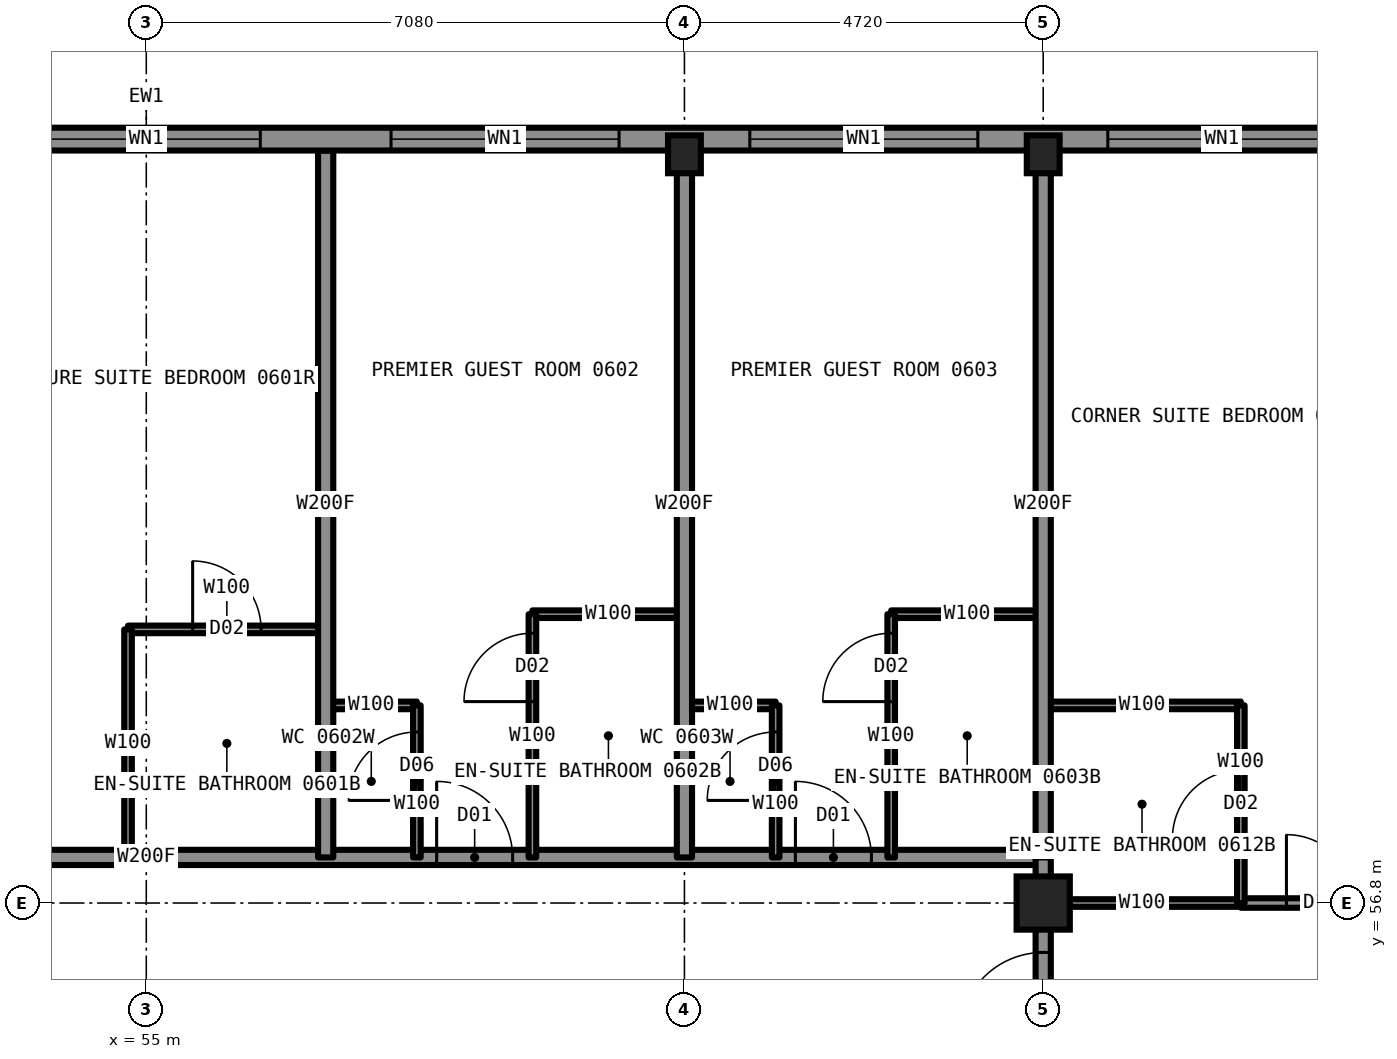
"""IFC4 building model, lengths in metres.
Left out: names, types, materials, properties, quantities, classifications, styles, units other than length and angle.
Written with IfcOpenShell. Run it as: python <this file> out.ifc"""

import sys

from ifc_helpers import new_model, si_unit, direction, frame, frame_2d, origin, origin_2d, place, context, subcontext, project, spatial, rectangle, hollow_rectangle, i_section, extrude, element, fill, save


model = new_model("IFC4")
c1 = context("Model", 3, precision=1e-05, world=origin(), true_north=direction((0.0, 1.0)))
c2 = subcontext(c1, "Body", "Model", "MODEL_VIEW")
j1 = project(units=[si_unit("LENGTHUNIT", "METRE"), si_unit("PLANEANGLEUNIT", "RADIAN")], contexts=[c1])
p1 = place(None, origin())
s1 = spatial("IfcSite", under=j1, at=p1, CompositionType="ELEMENT")
p2 = place(p1, origin())
s2 = spatial("IfcBuilding", under=s1, at=p2, CompositionType="ELEMENT")
p3 = place(p2, frame((0.0, 0.0, 28.5)))
s3 = spatial("IfcBuildingStorey", under=s2, at=p3, CompositionType="ELEMENT", Elevation=28.5)
for number, where, z_axis, x_axis in (
    (1, (62.08, 66.65, 0.0), (0.0, 0.0, 1.0), (1.0, 0.0, 0.0)),
    (2, (66.8, 66.65, 0.0), (0.0, 0.0, 1.0), (1.0, 0.0, 0.0)),
):
    element("IfcColumn", number, at=place(p3, frame(where, z_axis=z_axis, x_axis=x_axis)), inside=s3, PredefinedType="COLUMN", context=c2, shape_type="SweptSolid", body=[
        extrude(i_section(OverallWidth=0.432, OverallDepth=0.498, WebThickness=0.056, FlangeThickness=0.089, at=origin_2d()), origin(), (0.0, 0.0, 1.0), 3.5),
    ])
p4 = place(p3, frame((66.8, 56.8, 0.0), z_axis=(0.0, 0.0, 1.0), x_axis=(1.0, 0.0, 0.0)))
e3 = element("IfcColumn", 3, at=p4, inside=s3, PredefinedType="COLUMN", context=c2, shape_type="SweptSolid", body=[
    extrude(hollow_rectangle(XDim=0.7, YDim=0.7, WallThickness=0.06, at=origin_2d()), origin(), (0.0, 0.0, 1.0), 3.5),
])
p5 = place(p3, frame((66.8, 56.8, 0.0), z_axis=(0.0, 0.0, 1.0), x_axis=(1.0, 0.0, 0.0)))
e4 = element("IfcWall", 4, at=p5, inside=s3, PredefinedType="PARTITIONING", context=c2, shape_type="SweptSolid", body=[
    extrude(rectangle(XDim=2.6, YDim=0.1, at=frame_2d((1.3, 0.0))), origin(), (0.0, 0.0, 1.0), 2.573),
])
p6 = place(p3, frame((69.4, 56.8, 0.0), z_axis=(0.0, 0.0, 1.0), x_axis=(1.0, 0.0, 0.0)))
e5 = element("IfcWall", 5, at=p6, inside=s3, PredefinedType="PARTITIONING", context=c2, shape_type="SweptSolid", body=[
    extrude(rectangle(XDim=7.3, YDim=0.125, at=frame_2d((3.65, 0.0))), origin(), (0.0, 0.0, 1.0), 2.573),
])
p7 = place(p6, frame((0.6, 0.0, 0.0)))
e6 = element("IfcOpeningElement", 6, at=p7, cuts=e5, PredefinedType="OPENING", context=c2, shape_type="SweptSolid", body=[
    extrude(rectangle(XDim=0.9, YDim=2.2, at=frame_2d((0.45, 1.1))), frame((0.0, 0.073, 0.0), z_axis=(0.0, -1.0, 0.0), x_axis=(1.0, 0.0, 0.0)), (0.0, 0.0, 1.0), 0.145),
])
p8 = place(p6, frame((4.4, 0.0, 0.0)))
e7 = element("IfcOpeningElement", 7, at=p8, cuts=e5, PredefinedType="OPENING", context=c2, shape_type="SweptSolid", body=[
    extrude(rectangle(XDim=0.9, YDim=2.2, at=frame_2d((0.45, 1.1))), frame((0.0, 0.073, 0.0), z_axis=(0.0, -1.0, 0.0), x_axis=(1.0, 0.0, 0.0)), (0.0, 0.0, 1.0), 0.145),
])
p9 = place(p3, frame((43.2, 57.4, 0.0), z_axis=(0.0, 0.0, 1.0), x_axis=(1.0, 0.0, 0.0)))
e8 = element("IfcWall", 8, at=p9, inside=s3, PredefinedType="PARTITIONING", context=c2, shape_type="SweptSolid", body=[
    extrude(rectangle(XDim=23.6, YDim=0.2, at=frame_2d((11.8, 0.0))), origin(), (0.0, 0.0, 1.0), 3.33),
])
p10 = place(p9, frame((1.85, 0.0, 0.0)))
e9 = element("IfcOpeningElement", 9, at=p10, cuts=e8, PredefinedType="OPENING", context=c2, shape_type="SweptSolid", body=[
    extrude(rectangle(XDim=1.1, YDim=2.2, at=frame_2d((0.55, 1.1))), frame((0.0, 0.11, 0.0), z_axis=(0.0, -1.0, 0.0), x_axis=(1.0, 0.0, 0.0)), (0.0, 0.0, 1.0), 0.22),
])
p11 = place(p9, frame((15.62, 0.0, 0.0)))
e10 = element("IfcOpeningElement", 10, at=p11, cuts=e8, PredefinedType="OPENING", context=c2, shape_type="SweptSolid", body=[
    extrude(rectangle(XDim=1.0, YDim=2.2, at=frame_2d((0.5, 1.1))), frame((0.0, 0.11, 0.0), z_axis=(0.0, -1.0, 0.0), x_axis=(1.0, 0.0, 0.0)), (0.0, 0.0, 1.0), 0.22),
])
p12 = place(p9, frame((20.34, 0.0, 0.0)))
e11 = element("IfcOpeningElement", 11, at=p12, cuts=e8, PredefinedType="OPENING", context=c2, shape_type="SweptSolid", body=[
    extrude(rectangle(XDim=1.0, YDim=2.2, at=frame_2d((0.5, 1.1))), frame((0.0, 0.11, 0.0), z_axis=(0.0, -1.0, 0.0), x_axis=(1.0, 0.0, 0.0)), (0.0, 0.0, 1.0), 0.22),
])
for number, where, z_axis, x_axis in (
    (12, (57.36, 59.4, 0.0), (0.0, 0.0, 1.0), (1.0, 0.0, 0.0)),
    (13, (62.08, 59.4, 0.0), (0.0, 0.0, 1.0), (1.0, 0.0, 0.0)),
):
    element("IfcWall", number, at=place(p3, frame(where, z_axis=z_axis, x_axis=x_axis)), inside=s3, PredefinedType="PARTITIONING", context=c2, shape_type="SweptSolid", body=[
        extrude(rectangle(XDim=1.2, YDim=0.1, at=frame_2d((0.6, 0.0))), origin(), (0.0, 0.0, 1.0), 3.33),
    ])
p13 = place(p3, frame((66.8, 59.4, 0.0), z_axis=(0.0, 0.0, 1.0), x_axis=(1.0, 0.0, 0.0)))
e14 = element("IfcWall", 14, at=p13, inside=s3, PredefinedType="PARTITIONING", context=c2, shape_type="SweptSolid", body=[
    extrude(rectangle(XDim=2.6, YDim=0.1, at=frame_2d((1.3, 0.0))), origin(), (0.0, 0.0, 1.0), 3.33),
])
p14 = place(p3, frame((54.76, 60.4, 0.0), z_axis=(0.0, 0.0, 1.0), x_axis=(1.0, 0.0, 0.0)))
e15 = element("IfcWall", 15, at=p14, inside=s3, PredefinedType="PARTITIONING", context=c2, shape_type="SweptSolid", body=[
    extrude(rectangle(XDim=2.6, YDim=0.1, at=frame_2d((1.3, 0.0))), origin(), (0.0, 0.0, 1.0), 3.33),
])
p15 = place(p14, frame((0.85, 0.0, 0.0)))
e16 = element("IfcOpeningElement", 16, at=p15, cuts=e15, PredefinedType="OPENING", context=c2, shape_type="SweptSolid", body=[
    extrude(rectangle(XDim=0.9, YDim=2.1, at=frame_2d((0.45, 1.05))), frame((0.0, 0.06, 0.0), z_axis=(0.0, -1.0, 0.0), x_axis=(1.0, 0.0, 0.0)), (0.0, 0.0, 1.0), 0.12),
])
for number, where, z_axis, x_axis in (
    (17, (60.08, 60.6, 0.0), (0.0, 0.0, 1.0), (1.0, 0.0, 0.0)),
    (18, (64.8, 60.6, 0.0), (0.0, 0.0, 1.0), (1.0, 0.0, 0.0)),
):
    element("IfcWall", number, at=place(p3, frame(where, z_axis=z_axis, x_axis=x_axis)), inside=s3, PredefinedType="PARTITIONING", context=c2, shape_type="SweptSolid", body=[
        extrude(rectangle(XDim=2.0, YDim=0.1, at=frame_2d((1.0, 0.0))), origin(), (0.0, 0.0, 1.0), 3.33),
    ])
p16 = place(p3, frame((54.76, 57.4, 0.0), z_axis=(0.0, 0.0, 1.0), x_axis=(0.0, 1.0, 0.0)))
e19 = element("IfcWall", 19, at=p16, inside=s3, PredefinedType="PARTITIONING", context=c2, shape_type="SweptSolid", body=[
    extrude(rectangle(XDim=3.0, YDim=0.1, at=frame_2d((1.5, 0.0))), origin(), (0.0, 0.0, 1.0), 3.33),
])
p17 = place(p3, frame((66.8, 33.22, 0.0), z_axis=(0.0, 0.0, 1.0), x_axis=(0.0, 1.0, 0.0)))
e20 = element("IfcWall", 20, at=p17, inside=s3, PredefinedType="PARTITIONING", context=c2, shape_type="SweptSolid", body=[
    extrude(rectangle(XDim=23.56, YDim=0.2, at=frame_2d((11.78, 0.0))), origin(), (0.0, 0.0, 1.0), 3.33),
])
p18 = place(p17, frame((7.85, 0.0, 0.0)))
e21 = element("IfcOpeningElement", 21, at=p18, cuts=e20, PredefinedType="OPENING", context=c2, shape_type="SweptSolid", body=[
    extrude(rectangle(XDim=1.0, YDim=2.2, at=frame_2d((0.5, 1.1))), frame((0.0, 0.11, 0.0), z_axis=(0.0, -1.0, 0.0), x_axis=(1.0, 0.0, 0.0)), (0.0, 0.0, 1.0), 0.22),
])
p19 = place(p17, frame((12.42, 0.0, 0.0)))
e22 = element("IfcOpeningElement", 22, at=p19, cuts=e20, PredefinedType="OPENING", context=c2, shape_type="SweptSolid", body=[
    extrude(rectangle(XDim=1.0, YDim=2.2, at=frame_2d((0.5, 1.1))), frame((0.0, 0.11, 0.0), z_axis=(0.0, -1.0, 0.0), x_axis=(1.0, 0.0, 0.0)), (0.0, 0.0, 1.0), 0.22),
])
p20 = place(p17, frame((21.83, 0.0, 0.0)))
e23 = element("IfcOpeningElement", 23, at=p20, cuts=e20, PredefinedType="OPENING", context=c2, shape_type="SweptSolid", body=[
    extrude(rectangle(XDim=1.1, YDim=2.2, at=frame_2d((0.55, 1.1))), frame((0.0, 0.11, 0.0), z_axis=(0.0, -1.0, 0.0), x_axis=(1.0, 0.0, 0.0)), (0.0, 0.0, 1.0), 0.22),
])
p21 = place(p17, frame((0.63, 0.0, 0.0)))
e24 = element("IfcOpeningElement", 24, at=p21, cuts=e20, PredefinedType="OPENING", context=c2, shape_type="SweptSolid", body=[
    extrude(rectangle(XDim=1.1, YDim=2.2, at=frame_2d((0.55, 1.1))), frame((0.0, 0.11, 0.0), z_axis=(0.0, -1.0, 0.0), x_axis=(1.0, 0.0, 0.0)), (0.0, 0.0, 1.0), 0.22),
])
p22 = place(p3, frame((66.8, 57.4, 0.0), z_axis=(0.0, 0.0, 1.0), x_axis=(0.0, 1.0, 0.0)))
e25 = element("IfcWall", 25, at=p22, inside=s3, PredefinedType="PARTITIONING", context=c2, shape_type="SweptSolid", body=[
    extrude(rectangle(XDim=9.3, YDim=0.2, at=frame_2d((4.65, 0.0))), origin(), (0.0, 0.0, 1.0), 2.573),
])
p23 = place(p3, frame((69.4, 56.8, 0.0), z_axis=(0.0, 0.0, 1.0), x_axis=(0.0, 1.0, 0.0)))
e26 = element("IfcWall", 26, at=p23, inside=s3, PredefinedType="PARTITIONING", context=c2, shape_type="SweptSolid", body=[
    extrude(rectangle(XDim=2.6, YDim=0.1, at=frame_2d((1.3, 0.0))), origin(), (0.0, 0.0, 1.0), 3.33),
])
p24 = place(p23, frame((0.85, 0.0, 0.0)))
e27 = element("IfcOpeningElement", 27, at=p24, cuts=e26, PredefinedType="OPENING", context=c2, shape_type="SweptSolid", body=[
    extrude(rectangle(XDim=0.9, YDim=2.1, at=frame_2d((0.45, 1.05))), frame((0.0, 0.06, 0.0), z_axis=(0.0, -1.0, 0.0), x_axis=(1.0, 0.0, 0.0)), (0.0, 0.0, 1.0), 0.12),
])
p25 = place(p3, frame((57.36, 57.4, 0.0), z_axis=(0.0, 0.0, 1.0), x_axis=(0.0, 1.0, 0.0)))
e28 = element("IfcWall", 28, at=p25, inside=s3, PredefinedType="PARTITIONING", context=c2, shape_type="SweptSolid", body=[
    extrude(rectangle(XDim=9.3, YDim=0.2, at=frame_2d((4.65, 0.0))), origin(), (0.0, 0.0, 1.0), 3.33),
])
p26 = place(p3, frame((58.56, 57.4, 0.0), z_axis=(0.0, 0.0, 1.0), x_axis=(0.0, 1.0, 0.0)))
e29 = element("IfcWall", 29, at=p26, inside=s3, PredefinedType="PARTITIONING", context=c2, shape_type="SweptSolid", body=[
    extrude(rectangle(XDim=2.0, YDim=0.1, at=frame_2d((1.0, 0.0))), origin(), (0.0, 0.0, 1.0), 3.33),
])
p27 = place(p26, frame((0.75, 0.0, 0.0)))
e30 = element("IfcOpeningElement", 30, at=p27, cuts=e29, PredefinedType="OPENING", context=c2, shape_type="SweptSolid", body=[
    extrude(rectangle(XDim=0.9, YDim=2.1, at=frame_2d((0.45, 1.05))), frame((0.0, 0.06, 0.0), z_axis=(0.0, -1.0, 0.0), x_axis=(1.0, 0.0, 0.0)), (0.0, 0.0, 1.0), 0.12),
])
p28 = place(p3, frame((60.08, 57.4, 0.0), z_axis=(0.0, 0.0, 1.0), x_axis=(0.0, 1.0, 0.0)))
e31 = element("IfcWall", 31, at=p28, inside=s3, PredefinedType="PARTITIONING", context=c2, shape_type="SweptSolid", body=[
    extrude(rectangle(XDim=3.2, YDim=0.1, at=frame_2d((1.6, 0.0))), origin(), (0.0, 0.0, 1.0), 3.33),
])
p29 = place(p28, frame((2.05, 0.0, 0.0)))
e32 = element("IfcOpeningElement", 32, at=p29, cuts=e31, PredefinedType="OPENING", context=c2, shape_type="SweptSolid", body=[
    extrude(rectangle(XDim=0.9, YDim=2.1, at=frame_2d((0.45, 1.05))), frame((0.0, 0.06, 0.0), z_axis=(0.0, -1.0, 0.0), x_axis=(1.0, 0.0, 0.0)), (0.0, 0.0, 1.0), 0.12),
])
p30 = place(p3, frame((62.08, 57.4, 0.0), z_axis=(0.0, 0.0, 1.0), x_axis=(0.0, 1.0, 0.0)))
e33 = element("IfcWall", 33, at=p30, inside=s3, PredefinedType="PARTITIONING", context=c2, shape_type="SweptSolid", body=[
    extrude(rectangle(XDim=9.3, YDim=0.2, at=frame_2d((4.65, 0.0))), origin(), (0.0, 0.0, 1.0), 2.573),
])
p31 = place(p3, frame((63.28, 57.4, 0.0), z_axis=(0.0, 0.0, 1.0), x_axis=(0.0, 1.0, 0.0)))
e34 = element("IfcWall", 34, at=p31, inside=s3, PredefinedType="PARTITIONING", context=c2, shape_type="SweptSolid", body=[
    extrude(rectangle(XDim=2.0, YDim=0.1, at=frame_2d((1.0, 0.0))), origin(), (0.0, 0.0, 1.0), 3.33),
])
p32 = place(p31, frame((0.75, 0.0, 0.0)))
e35 = element("IfcOpeningElement", 35, at=p32, cuts=e34, PredefinedType="OPENING", context=c2, shape_type="SweptSolid", body=[
    extrude(rectangle(XDim=0.9, YDim=2.1, at=frame_2d((0.45, 1.05))), frame((0.0, 0.06, 0.0), z_axis=(0.0, -1.0, 0.0), x_axis=(1.0, 0.0, 0.0)), (0.0, 0.0, 1.0), 0.12),
])
p33 = place(p3, frame((64.8, 57.4, 0.0), z_axis=(0.0, 0.0, 1.0), x_axis=(0.0, 1.0, 0.0)))
e36 = element("IfcWall", 36, at=p33, inside=s3, PredefinedType="PARTITIONING", context=c2, shape_type="SweptSolid", body=[
    extrude(rectangle(XDim=3.2, YDim=0.1, at=frame_2d((1.6, 0.0))), origin(), (0.0, 0.0, 1.0), 3.33),
])
p34 = place(p33, frame((2.05, 0.0, 0.0)))
e37 = element("IfcOpeningElement", 37, at=p34, cuts=e36, PredefinedType="OPENING", context=c2, shape_type="SweptSolid", body=[
    extrude(rectangle(XDim=0.9, YDim=2.1, at=frame_2d((0.45, 1.05))), frame((0.0, 0.06, 0.0), z_axis=(0.0, -1.0, 0.0), x_axis=(1.0, 0.0, 0.0)), (0.0, 0.0, 1.0), 0.12),
])
p35 = place(p3, frame((71.5, 66.85, 0.0), z_axis=(0.0, 0.0, 1.0), x_axis=(-1.0, 0.0, 0.0)))
e38 = element("IfcWall", 38, at=p35, inside=s3, PredefinedType="SOLIDWALL", context=c2, shape_type="SweptSolid", body=[
    extrude(rectangle(XDim=33.0, YDim=0.3, at=frame_2d((16.5, 0.0))), origin(), (0.0, 0.0, 1.0), 2.83),
])
p36 = place(p35, frame((0.85, 0.0, 0.5)))
e39 = element("IfcOpeningElement", 39, at=p36, cuts=e38, PredefinedType="OPENING", context=c2, shape_type="SweptSolid", body=[
    extrude(rectangle(XDim=3.0, YDim=2.0, at=frame_2d((1.5, 1.0))), frame((0.0, 0.16, 0.0), z_axis=(0.0, -1.0, 0.0), x_axis=(1.0, 0.0, 0.0)), (0.0, 0.0, 1.0), 0.32),
])
p37 = place(p35, frame((5.56, 0.0, 0.5)))
e40 = element("IfcOpeningElement", 40, at=p37, cuts=e38, PredefinedType="OPENING", context=c2, shape_type="SweptSolid", body=[
    extrude(rectangle(XDim=3.0, YDim=2.0, at=frame_2d((1.5, 1.0))), frame((0.0, 0.16, 0.0), z_axis=(0.0, -1.0, 0.0), x_axis=(1.0, 0.0, 0.0)), (0.0, 0.0, 1.0), 0.32),
])
p38 = place(p35, frame((10.28, 0.0, 0.5)))
e41 = element("IfcOpeningElement", 41, at=p38, cuts=e38, PredefinedType="OPENING", context=c2, shape_type="SweptSolid", body=[
    extrude(rectangle(XDim=3.0, YDim=2.0, at=frame_2d((1.5, 1.0))), frame((0.0, 0.16, 0.0), z_axis=(0.0, -1.0, 0.0), x_axis=(1.0, 0.0, 0.0)), (0.0, 0.0, 1.0), 0.32),
])
p39 = place(p35, frame((15.0, 0.0, 0.5)))
e42 = element("IfcOpeningElement", 42, at=p39, cuts=e38, PredefinedType="OPENING", context=c2, shape_type="SweptSolid", body=[
    extrude(rectangle(XDim=3.0, YDim=2.0, at=frame_2d((1.5, 1.0))), frame((0.0, 0.16, 0.0), z_axis=(0.0, -1.0, 0.0), x_axis=(1.0, 0.0, 0.0)), (0.0, 0.0, 1.0), 0.32),
])
p40 = place(p35, frame((19.72, 0.0, 0.5)))
e43 = element("IfcOpeningElement", 43, at=p40, cuts=e38, PredefinedType="OPENING", context=c2, shape_type="SweptSolid", body=[
    extrude(rectangle(XDim=3.0, YDim=2.0, at=frame_2d((1.5, 1.0))), frame((0.0, 0.16, 0.0), z_axis=(0.0, -1.0, 0.0), x_axis=(1.0, 0.0, 0.0)), (0.0, 0.0, 1.0), 0.32),
])
p41 = place(p35, frame((24.44, 0.0, 0.5)))
e44 = element("IfcOpeningElement", 44, at=p41, cuts=e38, PredefinedType="OPENING", context=c2, shape_type="SweptSolid", body=[
    extrude(rectangle(XDim=3.0, YDim=2.0, at=frame_2d((1.5, 1.0))), frame((0.0, 0.16, 0.0), z_axis=(0.0, -1.0, 0.0), x_axis=(1.0, 0.0, 0.0)), (0.0, 0.0, 1.0), 0.32),
])
p42 = place(p35, frame((29.15, 0.0, 0.5)))
e45 = element("IfcOpeningElement", 45, at=p42, cuts=e38, PredefinedType="OPENING", context=c2, shape_type="SweptSolid", body=[
    extrude(rectangle(XDim=3.0, YDim=2.0, at=frame_2d((1.5, 1.0))), frame((0.0, 0.16, 0.0), z_axis=(0.0, -1.0, 0.0), x_axis=(1.0, 0.0, 0.0)), (0.0, 0.0, 1.0), 0.32),
])
p43 = place(p3, frame((66.8, 56.78, 0.0), z_axis=(0.0, 0.0, 1.0), x_axis=(0.0, 1.0, 0.0)))
e46 = element("IfcWall", 46, at=p43, inside=s3, PredefinedType="PARTITIONING", context=c2, shape_type="SweptSolid", body=[
    extrude(rectangle(XDim=0.62, YDim=0.2, at=frame_2d((0.31, 0.0))), origin(), (0.0, 0.0, 1.0), 2.573),
])
p44 = place(p15, origin())
e47 = element("IfcDoor", 47, at=p44, inside=s3, OperationType="SINGLE_SWING_RIGHT", PredefinedType="DOOR", context=c2, shape_type="SweptSolid", body=[
    extrude(rectangle(XDim=0.9, YDim=2.1, at=frame_2d((0.45, 1.05))), frame((0.0, 0.025, 0.0), z_axis=(0.0, -1.0, 0.0), x_axis=(1.0, 0.0, 0.0)), (0.0, 0.0, 1.0), 0.05),
])
fill(e16, e47)
p45 = place(p11, origin())
e48 = element("IfcDoor", 48, at=p45, inside=s3, OperationType="SINGLE_SWING_LEFT", PredefinedType="DOOR", context=c2, shape_type="SweptSolid", body=[
    extrude(rectangle(XDim=1.0, YDim=2.2, at=frame_2d((0.5, 1.1))), frame((0.0, 0.025, 0.0), z_axis=(0.0, -1.0, 0.0), x_axis=(1.0, 0.0, 0.0)), (0.0, 0.0, 1.0), 0.05),
])
fill(e10, e48)
p46 = place(p29, origin())
e49 = element("IfcDoor", 49, at=p46, inside=s3, OperationType="SINGLE_SWING_RIGHT", PredefinedType="DOOR", context=c2, shape_type="SweptSolid", body=[
    extrude(rectangle(XDim=0.9, YDim=2.1, at=frame_2d((0.45, 1.05))), frame((0.0, 0.025, 0.0), z_axis=(0.0, -1.0, 0.0), x_axis=(1.0, 0.0, 0.0)), (0.0, 0.0, 1.0), 0.05),
])
fill(e32, e49)
p47 = place(p27, origin())
e50 = element("IfcDoor", 50, at=p47, inside=s3, OperationType="SINGLE_SWING_LEFT", PredefinedType="DOOR", context=c2, shape_type="SweptSolid", body=[
    extrude(rectangle(XDim=0.9, YDim=2.1, at=frame_2d((0.45, 1.05))), frame((0.0, 0.025, 0.0), z_axis=(0.0, -1.0, 0.0), x_axis=(1.0, 0.0, 0.0)), (0.0, 0.0, 1.0), 0.05),
])
fill(e30, e50)
p48 = place(p12, origin())
e51 = element("IfcDoor", 51, at=p48, inside=s3, OperationType="SINGLE_SWING_LEFT", PredefinedType="DOOR", context=c2, shape_type="SweptSolid", body=[
    extrude(rectangle(XDim=1.0, YDim=2.2, at=frame_2d((0.5, 1.1))), frame((0.0, 0.025, 0.0), z_axis=(0.0, -1.0, 0.0), x_axis=(1.0, 0.0, 0.0)), (0.0, 0.0, 1.0), 0.05),
])
fill(e11, e51)
p49 = place(p34, origin())
e52 = element("IfcDoor", 52, at=p49, inside=s3, OperationType="SINGLE_SWING_RIGHT", PredefinedType="DOOR", context=c2, shape_type="SweptSolid", body=[
    extrude(rectangle(XDim=0.9, YDim=2.1, at=frame_2d((0.45, 1.05))), frame((0.0, 0.025, 0.0), z_axis=(0.0, -1.0, 0.0), x_axis=(1.0, 0.0, 0.0)), (0.0, 0.0, 1.0), 0.05),
])
fill(e37, e52)
p50 = place(p32, origin())
e53 = element("IfcDoor", 53, at=p50, inside=s3, OperationType="SINGLE_SWING_LEFT", PredefinedType="DOOR", context=c2, shape_type="SweptSolid", body=[
    extrude(rectangle(XDim=0.9, YDim=2.1, at=frame_2d((0.45, 1.05))), frame((0.0, 0.025, 0.0), z_axis=(0.0, -1.0, 0.0), x_axis=(1.0, 0.0, 0.0)), (0.0, 0.0, 1.0), 0.05),
])
fill(e35, e53)
p51 = place(p20, origin())
e54 = element("IfcDoor", 54, at=p51, inside=s3, OperationType="SINGLE_SWING_LEFT", PredefinedType="DOOR", context=c2, shape_type="SweptSolid", body=[
    extrude(rectangle(XDim=1.1, YDim=2.2, at=frame_2d((0.55, 1.1))), frame((0.0, 0.025, 0.0), z_axis=(0.0, -1.0, 0.0), x_axis=(1.0, 0.0, 0.0)), (0.0, 0.0, 1.0), 0.05),
])
fill(e23, e54)
p52 = place(p24, origin())
e55 = element("IfcDoor", 55, at=p52, inside=s3, OperationType="SINGLE_SWING_RIGHT", PredefinedType="DOOR", context=c2, shape_type="SweptSolid", body=[
    extrude(rectangle(XDim=0.9, YDim=2.1, at=frame_2d((0.45, 1.05))), frame((0.0, 0.025, 0.0), z_axis=(0.0, -1.0, 0.0), x_axis=(1.0, 0.0, 0.0)), (0.0, 0.0, 1.0), 0.05),
])
fill(e27, e55)
p53 = place(p7, origin())
e56 = element("IfcDoor", 56, at=p53, inside=s3, OperationType="SINGLE_SWING_LEFT", PredefinedType="DOOR", context=c2, shape_type="SweptSolid", body=[
    extrude(rectangle(XDim=0.9, YDim=2.2, at=frame_2d((0.45, 1.1))), frame((0.0, 0.025, 0.0), z_axis=(0.0, -1.0, 0.0), x_axis=(1.0, 0.0, 0.0)), (0.0, 0.0, 1.0), 0.05),
])
fill(e6, e56)
p54 = place(p36, origin())
e57 = element("IfcWindow", 57, at=p54, inside=s3, PartitioningType="SINGLE_PANEL", PredefinedType="WINDOW", context=c2, shape_type="SweptSolid", body=[
    extrude(rectangle(XDim=3.0, YDim=2.0, at=frame_2d((1.5, 1.0))), frame((0.0, 0.03, 0.0), z_axis=(0.0, -1.0, 0.0), x_axis=(1.0, 0.0, 0.0)), (0.0, 0.0, 1.0), 0.06),
])
fill(e39, e57)
p55 = place(p37, origin())
e58 = element("IfcWindow", 58, at=p55, inside=s3, PartitioningType="SINGLE_PANEL", PredefinedType="WINDOW", context=c2, shape_type="SweptSolid", body=[
    extrude(rectangle(XDim=3.0, YDim=2.0, at=frame_2d((1.5, 1.0))), frame((0.0, 0.03, 0.0), z_axis=(0.0, -1.0, 0.0), x_axis=(1.0, 0.0, 0.0)), (0.0, 0.0, 1.0), 0.06),
])
fill(e40, e58)
p56 = place(p38, origin())
e59 = element("IfcWindow", 59, at=p56, inside=s3, PartitioningType="SINGLE_PANEL", PredefinedType="WINDOW", context=c2, shape_type="SweptSolid", body=[
    extrude(rectangle(XDim=3.0, YDim=2.0, at=frame_2d((1.5, 1.0))), frame((0.0, 0.03, 0.0), z_axis=(0.0, -1.0, 0.0), x_axis=(1.0, 0.0, 0.0)), (0.0, 0.0, 1.0), 0.06),
])
fill(e41, e59)
p57 = place(p39, origin())
e60 = element("IfcWindow", 60, at=p57, inside=s3, PartitioningType="SINGLE_PANEL", PredefinedType="WINDOW", context=c2, shape_type="SweptSolid", body=[
    extrude(rectangle(XDim=3.0, YDim=2.0, at=frame_2d((1.5, 1.0))), frame((0.0, 0.03, 0.0), z_axis=(0.0, -1.0, 0.0), x_axis=(1.0, 0.0, 0.0)), (0.0, 0.0, 1.0), 0.06),
])
fill(e42, e60)
save(model, sys.argv[1])
